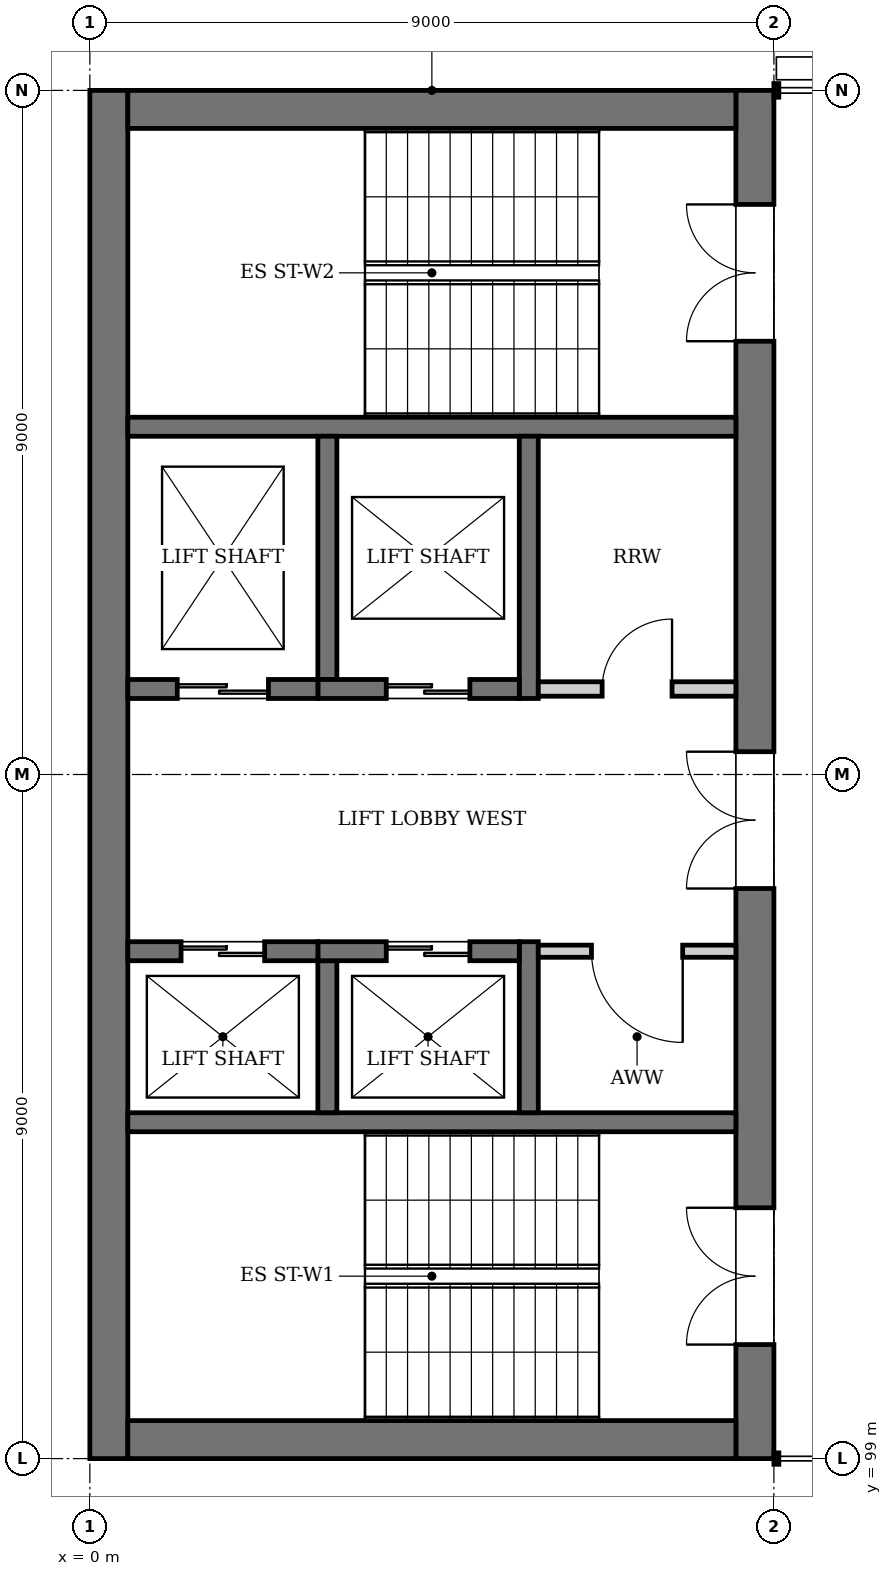
"""IFC4 building model, lengths in metres.
Left out: names, types, materials, properties, quantities, classifications, styles, units other than length and angle.
Written with IfcOpenShell. Run it as: python <this file> out.ifc"""

import sys

from ifc_helpers import new_model, si_unit, direction, frame, frame_2d, origin, place, context, subcontext, project, spatial, rectangle, extrude, element, fill, save


model = new_model("IFC4")
c1 = context("Model", 3, precision=1e-05, world=origin(), true_north=direction((0.0, 1.0)))
c2 = subcontext(c1, "Body", "Model", "MODEL_VIEW")
j1 = project(units=[si_unit("LENGTHUNIT", "METRE"), si_unit("PLANEANGLEUNIT", "RADIAN")], contexts=[c1])
p1 = place(None, origin())
s1 = spatial("IfcSite", under=j1, at=p1, CompositionType="ELEMENT")
p2 = place(p1, origin())
s2 = spatial("IfcBuilding", under=s1, at=p2, CompositionType="ELEMENT")
p3 = place(p2, frame((0.0, 0.0, 31.2)))
s3 = spatial("IfcBuildingStorey", under=s2, at=p3, CompositionType="ELEMENT", Elevation=31.2)
p4 = place(p3, frame((0.25, 99.0, 0.0), z_axis=(0.0, 0.0, 1.0), x_axis=(0.0, 1.0, 0.0)))
e1 = element("IfcWall", 1, at=p4, inside=s3, PredefinedType="SHEAR", context=c2, shape_type="SweptSolid", body=[
    extrude(rectangle(XDim=18.0, YDim=0.5, at=frame_2d((9.0, 0.0))), origin(), (0.0, 0.0, 1.0), 4.0),
])
p5 = place(p3, frame((8.75, 99.0, 0.0), z_axis=(0.0, 0.0, 1.0), x_axis=(0.0, 1.0, 0.0)))
e2 = element("IfcWall", 2, at=p5, inside=s3, PredefinedType="SHEAR", context=c2, shape_type="SweptSolid", body=[
    extrude(rectangle(XDim=18.0, YDim=0.5, at=frame_2d((9.0, 0.0))), origin(), (0.0, 0.0, 1.0), 4.0),
])
p6 = place(p5, frame((1.5, 0.0, 0.0)))
e3 = element("IfcOpeningElement", 3, at=p6, cuts=e2, PredefinedType="OPENING", context=c2, shape_type="SweptSolid", body=[
    extrude(rectangle(XDim=1.8, YDim=2.1, at=frame_2d((0.9, 1.05))), frame((0.0, 0.26, 0.0), z_axis=(0.0, -1.0, 0.0), x_axis=(1.0, 0.0, 0.0)), (0.0, 0.0, 1.0), 0.52),
])
p7 = place(p5, frame((14.7, 0.0, 0.0)))
e4 = element("IfcOpeningElement", 4, at=p7, cuts=e2, PredefinedType="OPENING", context=c2, shape_type="SweptSolid", body=[
    extrude(rectangle(XDim=1.8, YDim=2.1, at=frame_2d((0.9, 1.05))), frame((0.0, 0.26, 0.0), z_axis=(0.0, -1.0, 0.0), x_axis=(1.0, 0.0, 0.0)), (0.0, 0.0, 1.0), 0.52),
])
p8 = place(p5, frame((7.5, 0.0, 0.0)))
e5 = element("IfcOpeningElement", 5, at=p8, cuts=e2, PredefinedType="OPENING", context=c2, shape_type="SweptSolid", body=[
    extrude(rectangle(XDim=1.8, YDim=2.1, at=frame_2d((0.9, 1.05))), frame((0.0, 0.26, 0.0), z_axis=(0.0, -1.0, 0.0), x_axis=(1.0, 0.0, 0.0)), (0.0, 0.0, 1.0), 0.52),
])
for number, where, z_axis, x_axis in (
    (6, (0.5, 99.25, 0.0), (0.0, 0.0, 1.0), (1.0, 0.0, 0.0)),
    (7, (0.5, 116.75, 0.0), (0.0, 0.0, 1.0), (1.0, 0.0, 0.0)),
):
    element("IfcWall", number, at=place(p3, frame(where, z_axis=z_axis, x_axis=x_axis)), inside=s3, PredefinedType="SHEAR", context=c2, shape_type="SweptSolid", body=[
        extrude(rectangle(XDim=8.0, YDim=0.5, at=frame_2d((4.0, 0.0))), origin(), (0.0, 0.0, 1.0), 4.0),
    ])
for number, where, z_axis, x_axis in (
    (8, (8.5, 103.425, 0.0), (0.0, 0.0, 1.0), (-1.0, 0.0, 0.0)),
    (9, (8.5, 112.575, 0.0), (0.0, 0.0, 1.0), (-1.0, 0.0, 0.0)),
):
    element("IfcWall", number, at=place(p3, frame(where, z_axis=z_axis, x_axis=x_axis)), inside=s3, PredefinedType="SOLIDWALL", context=c2, shape_type="SweptSolid", body=[
        extrude(rectangle(XDim=8.0, YDim=0.25, at=frame_2d((4.0, 0.0))), origin(), (0.0, 0.0, 1.0), 3.75),
    ])
p9 = place(p3, frame((5.775, 103.55, 0.0), z_axis=(0.0, 0.0, 1.0), x_axis=(0.0, 1.0, 0.0)))
e10 = element("IfcWall", 10, at=p9, inside=s3, PredefinedType="SOLIDWALL", context=c2, shape_type="SweptSolid", body=[
    extrude(rectangle(XDim=2.25, YDim=0.25, at=frame_2d((1.125, 0.0))), origin(), (0.0, 0.0, 1.0), 4.0),
])
p10 = place(p3, frame((3.125, 103.55, 0.0), z_axis=(0.0, 0.0, 1.0), x_axis=(0.0, 1.0, 0.0)))
e11 = element("IfcWall", 11, at=p10, inside=s3, PredefinedType="SOLIDWALL", context=c2, shape_type="SweptSolid", body=[
    extrude(rectangle(XDim=2.0, YDim=0.25, at=frame_2d((1.0, 0.0))), origin(), (0.0, 0.0, 1.0), 4.0),
])
p11 = place(p3, frame((5.65, 105.675, 0.0), z_axis=(0.0, 0.0, 1.0), x_axis=(-1.0, 0.0, 0.0)))
e12 = element("IfcWall", 12, at=p11, inside=s3, PredefinedType="SOLIDWALL", context=c2, shape_type="SweptSolid", body=[
    extrude(rectangle(XDim=2.65, YDim=0.25, at=frame_2d((1.325, 0.0))), origin(), (0.0, 0.0, 1.0), 4.0),
])
p12 = place(p11, frame((0.65, 0.0, 0.0)))
e13 = element("IfcOpeningElement", 13, at=p12, cuts=e12, PredefinedType="OPENING", context=c2, shape_type="SweptSolid", body=[
    extrude(rectangle(XDim=1.1, YDim=2.1, at=frame_2d((0.55, 1.05))), frame((0.0, 0.135, 0.0), z_axis=(0.0, -1.0, 0.0), x_axis=(1.0, 0.0, 0.0)), (0.0, 0.0, 1.0), 0.27),
])
p13 = place(p3, frame((3.0, 105.675, 0.0), z_axis=(0.0, 0.0, 1.0), x_axis=(-1.0, 0.0, 0.0)))
e14 = element("IfcWall", 14, at=p13, inside=s3, PredefinedType="SOLIDWALL", context=c2, shape_type="SweptSolid", body=[
    extrude(rectangle(XDim=2.5, YDim=0.25, at=frame_2d((1.25, 0.0))), origin(), (0.0, 0.0, 1.0), 4.0),
])
p14 = place(p13, frame((0.7, 0.0, 0.0)))
e15 = element("IfcOpeningElement", 15, at=p14, cuts=e14, PredefinedType="OPENING", context=c2, shape_type="SweptSolid", body=[
    extrude(rectangle(XDim=1.1, YDim=2.1, at=frame_2d((0.55, 1.05))), frame((0.0, 0.135, 0.0), z_axis=(0.0, -1.0, 0.0), x_axis=(1.0, 0.0, 0.0)), (0.0, 0.0, 1.0), 0.27),
])
p15 = place(p3, frame((5.775, 109.0, 0.0), z_axis=(0.0, 0.0, 1.0), x_axis=(0.0, 1.0, 0.0)))
e16 = element("IfcWall", 16, at=p15, inside=s3, PredefinedType="SOLIDWALL", context=c2, shape_type="SweptSolid", body=[
    extrude(rectangle(XDim=3.45, YDim=0.25, at=frame_2d((1.725, 0.0))), origin(), (0.0, 0.0, 1.0), 4.0),
])
p16 = place(p3, frame((3.125, 109.25, 0.0), z_axis=(0.0, 0.0, 1.0), x_axis=(0.0, 1.0, 0.0)))
e17 = element("IfcWall", 17, at=p16, inside=s3, PredefinedType="SOLIDWALL", context=c2, shape_type="SweptSolid", body=[
    extrude(rectangle(XDim=3.2, YDim=0.25, at=frame_2d((1.6, 0.0))), origin(), (0.0, 0.0, 1.0), 4.0),
])
p17 = place(p3, frame((5.65, 109.125, 0.0), z_axis=(0.0, 0.0, 1.0), x_axis=(-1.0, 0.0, 0.0)))
e18 = element("IfcWall", 18, at=p17, inside=s3, PredefinedType="SOLIDWALL", context=c2, shape_type="SweptSolid", body=[
    extrude(rectangle(XDim=2.65, YDim=0.25, at=frame_2d((1.325, 0.0))), origin(), (0.0, 0.0, 1.0), 4.0),
])
p18 = place(p17, frame((0.65, 0.0, 0.0)))
e19 = element("IfcOpeningElement", 19, at=p18, cuts=e18, PredefinedType="OPENING", context=c2, shape_type="SweptSolid", body=[
    extrude(rectangle(XDim=1.1, YDim=2.1, at=frame_2d((0.55, 1.05))), frame((0.0, 0.135, 0.0), z_axis=(0.0, -1.0, 0.0), x_axis=(1.0, 0.0, 0.0)), (0.0, 0.0, 1.0), 0.27),
])
p19 = place(p3, frame((3.0, 109.125, 0.0), z_axis=(0.0, 0.0, 1.0), x_axis=(-1.0, 0.0, 0.0)))
e20 = element("IfcWall", 20, at=p19, inside=s3, PredefinedType="SOLIDWALL", context=c2, shape_type="SweptSolid", body=[
    extrude(rectangle(XDim=2.5, YDim=0.25, at=frame_2d((1.25, 0.0))), origin(), (0.0, 0.0, 1.0), 4.0),
])
p20 = place(p19, frame((0.65, 0.0, 0.0)))
e21 = element("IfcOpeningElement", 21, at=p20, cuts=e20, PredefinedType="OPENING", context=c2, shape_type="SweptSolid", body=[
    extrude(rectangle(XDim=1.2, YDim=2.1, at=frame_2d((0.6, 1.05))), frame((0.0, 0.135, 0.0), z_axis=(0.0, -1.0, 0.0), x_axis=(1.0, 0.0, 0.0)), (0.0, 0.0, 1.0), 0.27),
])
p21 = place(p3, frame((8.5, 105.675, 0.0), z_axis=(0.0, 0.0, 1.0), x_axis=(-1.0, 0.0, 0.0)))
e22 = element("IfcWall", 22, at=p21, inside=s3, PredefinedType="PARTITIONING", context=c2, shape_type="SweptSolid", body=[
    extrude(rectangle(XDim=2.6, YDim=0.16, at=frame_2d((1.3, 0.0))), origin(), (0.0, 0.0, 1.0), 3.75),
])
p22 = place(p21, frame((0.7, 0.0, 0.0)))
e23 = element("IfcOpeningElement", 23, at=p22, cuts=e22, PredefinedType="OPENING", context=c2, shape_type="SweptSolid", body=[
    extrude(rectangle(XDim=1.2, YDim=2.1, at=frame_2d((0.6, 1.05))), frame((0.0, 0.09, 0.0), z_axis=(0.0, -1.0, 0.0), x_axis=(1.0, 0.0, 0.0)), (0.0, 0.0, 1.0), 0.18),
])
p23 = place(p3, frame((8.5, 109.125, 0.0), z_axis=(0.0, 0.0, 1.0), x_axis=(-1.0, 0.0, 0.0)))
e24 = element("IfcWall", 24, at=p23, inside=s3, PredefinedType="PARTITIONING", context=c2, shape_type="SweptSolid", body=[
    extrude(rectangle(XDim=2.6, YDim=0.19, at=frame_2d((1.3, 0.0))), origin(), (0.0, 0.0, 1.0), 3.75),
])
p24 = place(p23, frame((0.84, 0.0, 0.0)))
e25 = element("IfcOpeningElement", 25, at=p24, cuts=e24, PredefinedType="OPENING", context=c2, shape_type="SweptSolid", body=[
    extrude(rectangle(XDim=0.92, YDim=2.1, at=frame_2d((0.46, 1.05))), frame((0.0, 0.105, 0.0), z_axis=(0.0, -1.0, 0.0), x_axis=(1.0, 0.0, 0.0)), (0.0, 0.0, 1.0), 0.21),
])
p25 = place(p12, origin())
e26 = element("IfcDoor", 26, at=p25, inside=s3, OperationType="DOUBLE_DOOR_SLIDING", PredefinedType="DOOR", context=c2, shape_type="SweptSolid", body=[
    extrude(rectangle(XDim=1.1, YDim=2.1, at=frame_2d((0.55, 1.05))), frame((0.0, 0.025, 0.0), z_axis=(0.0, -1.0, 0.0), x_axis=(1.0, 0.0, 0.0)), (0.0, 0.0, 1.0), 0.05),
])
fill(e13, e26)
p26 = place(p14, origin())
e27 = element("IfcDoor", 27, at=p26, inside=s3, OperationType="DOUBLE_DOOR_SLIDING", PredefinedType="DOOR", context=c2, shape_type="SweptSolid", body=[
    extrude(rectangle(XDim=1.1, YDim=2.1, at=frame_2d((0.55, 1.05))), frame((0.0, 0.025, 0.0), z_axis=(0.0, -1.0, 0.0), x_axis=(1.0, 0.0, 0.0)), (0.0, 0.0, 1.0), 0.05),
])
fill(e15, e27)
p27 = place(p18, origin())
e28 = element("IfcDoor", 28, at=p27, inside=s3, OperationType="DOUBLE_DOOR_SLIDING", PredefinedType="DOOR", context=c2, shape_type="SweptSolid", body=[
    extrude(rectangle(XDim=1.1, YDim=2.1, at=frame_2d((0.55, 1.05))), frame((0.0, 0.025, 0.0), z_axis=(0.0, -1.0, 0.0), x_axis=(1.0, 0.0, 0.0)), (0.0, 0.0, 1.0), 0.05),
])
fill(e19, e28)
p28 = place(p20, origin())
e29 = element("IfcDoor", 29, at=p28, inside=s3, OperationType="DOUBLE_DOOR_SLIDING", PredefinedType="DOOR", context=c2, shape_type="SweptSolid", body=[
    extrude(rectangle(XDim=1.2, YDim=2.1, at=frame_2d((0.6, 1.05))), frame((0.0, 0.025, 0.0), z_axis=(0.0, -1.0, 0.0), x_axis=(1.0, 0.0, 0.0)), (0.0, 0.0, 1.0), 0.05),
])
fill(e21, e29)
p29 = place(p6, origin())
e30 = element("IfcDoor", 30, at=p29, inside=s3, OperationType="DOUBLE_DOOR_SINGLE_SWING", PredefinedType="DOOR", context=c2, shape_type="SweptSolid", body=[
    extrude(rectangle(XDim=1.8, YDim=2.1, at=frame_2d((0.9, 1.05))), frame((0.0, 0.025, 0.0), z_axis=(0.0, -1.0, 0.0), x_axis=(1.0, 0.0, 0.0)), (0.0, 0.0, 1.0), 0.05),
])
fill(e3, e30)
p30 = place(p7, origin())
e31 = element("IfcDoor", 31, at=p30, inside=s3, OperationType="DOUBLE_DOOR_SINGLE_SWING", PredefinedType="DOOR", context=c2, shape_type="SweptSolid", body=[
    extrude(rectangle(XDim=1.8, YDim=2.1, at=frame_2d((0.9, 1.05))), frame((0.0, 0.025, 0.0), z_axis=(0.0, -1.0, 0.0), x_axis=(1.0, 0.0, 0.0)), (0.0, 0.0, 1.0), 0.05),
])
fill(e4, e31)
p31 = place(p8, origin())
e32 = element("IfcDoor", 32, at=p31, inside=s3, OperationType="DOUBLE_DOOR_SINGLE_SWING", PredefinedType="DOOR", context=c2, shape_type="SweptSolid", body=[
    extrude(rectangle(XDim=1.8, YDim=2.1, at=frame_2d((0.9, 1.05))), frame((0.0, 0.025, 0.0), z_axis=(0.0, -1.0, 0.0), x_axis=(1.0, 0.0, 0.0)), (0.0, 0.0, 1.0), 0.05),
])
fill(e5, e32)
p32 = place(p22, origin())
e33 = element("IfcDoor", 33, at=p32, inside=s3, OperationType="SINGLE_SWING_LEFT", PredefinedType="DOOR", context=c2, shape_type="SweptSolid", body=[
    extrude(rectangle(XDim=1.2, YDim=2.1, at=frame_2d((0.6, 1.05))), frame((0.0, 0.025, 0.0), z_axis=(0.0, -1.0, 0.0), x_axis=(1.0, 0.0, 0.0)), (0.0, 0.0, 1.0), 0.05),
])
fill(e23, e33)
p33 = place(p24, frame((0.92, 0.0, 0.0), z_axis=(0.0, 0.0, 1.0), x_axis=(-1.0, 0.0, 0.0)))
e34 = element("IfcDoor", 34, at=p33, inside=s3, OperationType="SINGLE_SWING_RIGHT", PredefinedType="DOOR", context=c2, shape_type="SweptSolid", body=[
    extrude(rectangle(XDim=0.92, YDim=2.1, at=frame_2d((0.46, 1.05))), frame((0.0, 0.025, 0.0), z_axis=(0.0, -1.0, 0.0), x_axis=(1.0, 0.0, 0.0)), (0.0, 0.0, 1.0), 0.05),
])
fill(e25, e34)
save(model, sys.argv[1])
